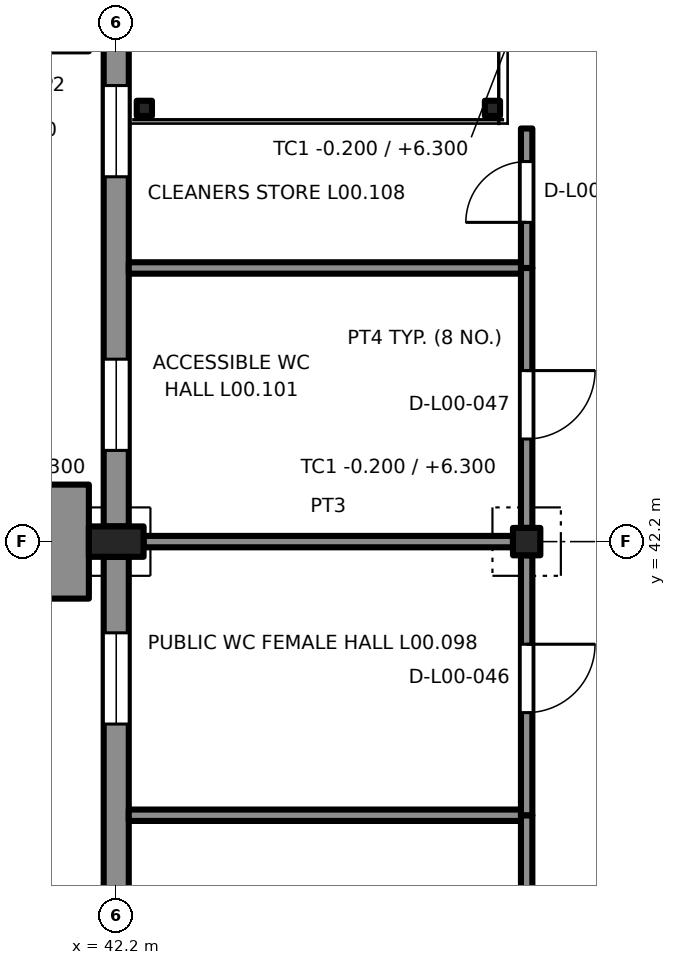
"""IFC4 building model, lengths in metres.
Left out: names, types, materials, properties, quantities, classifications, styles, units other than length and angle.
Written with IfcOpenShell. Run it as: python <this file> out.ifc"""

import sys

from ifc_helpers import new_model, si_unit, direction, frame, frame_2d, origin, origin_2d, place, context, subcontext, project, spatial, rectangle, extrude, element, fill, save


model = new_model("IFC4")
c1 = context("Model", 3, precision=1e-05, world=origin(), true_north=direction((0.0, 1.0)))
c2 = subcontext(c1, "Body", "Model", "MODEL_VIEW")
j1 = project(units=[si_unit("LENGTHUNIT", "METRE"), si_unit("PLANEANGLEUNIT", "RADIAN")], contexts=[c1])
p1 = place(None, origin())
s1 = spatial("IfcSite", under=j1, at=p1, CompositionType="ELEMENT")
p2 = place(p1, origin())
s2 = spatial("IfcBuilding", under=s1, at=p2, CompositionType="ELEMENT")
p3 = place(p2, origin())
s3 = spatial("IfcBuildingStorey", under=s2, at=p3, CompositionType="ELEMENT", Elevation=0.0)
p4 = place(p3, frame((42.2, 42.2, -0.2), z_axis=(0.0, 0.0, 1.0), x_axis=(0.0, 1.0, 0.0)))
e1 = element("IfcColumn", 1, at=p4, inside=s3, PredefinedType="COLUMN", context=c2, shape_type="SweptSolid", body=[
    extrude(rectangle(XDim=0.4, YDim=0.72, at=origin_2d()), origin(), (0.0, 0.0, 1.0), 6.5),
])
p5 = place(p3, frame((47.6, 42.2, -0.2), z_axis=(0.0, 0.0, 1.0), x_axis=(1.0, 0.0, 0.0)))
e2 = element("IfcColumn", 2, at=p5, inside=s3, PredefinedType="COLUMN", context=c2, shape_type="SweptSolid", body=[
    extrude(rectangle(XDim=0.36, YDim=0.36, at=origin_2d()), origin(), (0.0, 0.0, 1.0), 6.5),
])
for number, where, z_axis, x_axis in (
    (3, (42.57, 47.9, 0.0), (0.0, 0.0, 1.0), (1.0, 0.0, 0.0)),
    (4, (47.15, 47.9, 0.0), (0.0, 0.0, 1.0), (1.0, 0.0, 0.0)),
):
    element("IfcColumn", number, at=place(p3, frame(where, z_axis=z_axis, x_axis=x_axis)), inside=s3, PredefinedType="COLUMN", context=c2, shape_type="SweptSolid", body=[
        extrude(rectangle(XDim=0.2, YDim=0.2, at=origin_2d()), origin(), (0.0, 0.0, 1.0), 2.95),
    ])
p6 = place(p3, frame((42.2, 35.2, 0.0), z_axis=(0.0, 0.0, 1.0), x_axis=(0.0, 1.0, 0.0)))
e5 = element("IfcWall", 5, at=p6, inside=s3, PredefinedType="SOLIDWALL", context=c2, shape_type="SweptSolid", body=[
    extrude(rectangle(XDim=6.8, YDim=0.33, at=frame_2d((3.4, 0.0))), origin(), (0.0, 0.0, 1.0), 5.62),
])
p7 = place(p6, frame((1.0, 0.0, 0.9)))
e6 = element("IfcOpeningElement", 6, at=p7, cuts=e5, PredefinedType="OPENING", context=c2, shape_type="SweptSolid", body=[
    extrude(rectangle(XDim=1.2, YDim=4.2, at=frame_2d((0.6, 2.1))), frame((0.0, 0.175, 0.0), z_axis=(0.0, -1.0, 0.0), x_axis=(1.0, 0.0, 0.0)), (0.0, 0.0, 1.0), 0.35),
])
p8 = place(p6, frame((4.6, 0.0, 0.9)))
e7 = element("IfcOpeningElement", 7, at=p8, cuts=e5, PredefinedType="OPENING", context=c2, shape_type="SweptSolid", body=[
    extrude(rectangle(XDim=1.2, YDim=4.2, at=frame_2d((0.6, 2.1))), frame((0.0, 0.175, 0.0), z_axis=(0.0, -1.0, 0.0), x_axis=(1.0, 0.0, 0.0)), (0.0, 0.0, 1.0), 0.35),
])
p9 = place(p3, frame((42.2, 42.4, 0.0), z_axis=(0.0, 0.0, 1.0), x_axis=(0.0, 1.0, 0.0)))
e8 = element("IfcWall", 8, at=p9, inside=s3, PredefinedType="SOLIDWALL", context=c2, shape_type="SweptSolid", body=[
    extrude(rectangle(XDim=6.8, YDim=0.33, at=frame_2d((3.4, 0.0))), origin(), (0.0, 0.0, 1.0), 5.62),
])
p10 = place(p9, frame((1.0, 0.0, 0.9)))
e9 = element("IfcOpeningElement", 9, at=p10, cuts=e8, PredefinedType="OPENING", context=c2, shape_type="SweptSolid", body=[
    extrude(rectangle(XDim=1.2, YDim=4.2, at=frame_2d((0.6, 2.1))), frame((0.0, 0.175, 0.0), z_axis=(0.0, -1.0, 0.0), x_axis=(1.0, 0.0, 0.0)), (0.0, 0.0, 1.0), 0.35),
])
p11 = place(p9, frame((4.6, 0.0, 0.9)))
e10 = element("IfcOpeningElement", 10, at=p11, cuts=e8, PredefinedType="OPENING", context=c2, shape_type="SweptSolid", body=[
    extrude(rectangle(XDim=1.2, YDim=4.2, at=frame_2d((0.6, 2.1))), frame((0.0, 0.175, 0.0), z_axis=(0.0, -1.0, 0.0), x_axis=(1.0, 0.0, 0.0)), (0.0, 0.0, 1.0), 0.35),
])
p12 = place(p3, frame((41.29, 41.45, 0.0), z_axis=(0.0, 0.0, 1.0), x_axis=(0.0, 1.0, 0.0)))
e11 = element("IfcWall", 11, at=p12, inside=s3, PredefinedType="SOLIDWALL", context=c2, shape_type="SweptSolid", body=[
    extrude(rectangle(XDim=1.5, YDim=1.1, at=frame_2d((0.75, 0.0))), origin(), (0.0, 0.0, 1.0), 6.3),
])
p13 = place(p3, frame((47.6, 38.6, 0.0), z_axis=(0.0, 0.0, 1.0), x_axis=(0.0, -1.0, 0.0)))
e12 = element("IfcWall", 12, at=p13, inside=s3, PredefinedType="PARTITIONING", context=c2, shape_type="SweptSolid", body=[
    extrude(rectangle(XDim=3.42, YDim=0.15, at=frame_2d((1.71, 0.0))), origin(), (0.0, 0.0, 1.0), 5.62),
])
p14 = place(p13, frame((1.35, 0.0, 0.0)))
e13 = element("IfcOpeningElement", 13, at=p14, cuts=e12, PredefinedType="OPENING", context=c2, shape_type="SweptSolid", body=[
    extrude(rectangle(XDim=0.9, YDim=2.1, at=frame_2d((0.45, 1.05))), frame((0.0, 0.085, 0.0), z_axis=(0.0, -1.0, 0.0), x_axis=(1.0, 0.0, 0.0)), (0.0, 0.0, 1.0), 0.17),
])
p15 = place(p3, frame((47.6, 42.02, 0.0), z_axis=(0.0, 0.0, 1.0), x_axis=(0.0, -1.0, 0.0)))
e14 = element("IfcWall", 14, at=p15, inside=s3, PredefinedType="PARTITIONING", context=c2, shape_type="SweptSolid", body=[
    extrude(rectangle(XDim=3.42, YDim=0.15, at=frame_2d((1.71, 0.0))), origin(), (0.0, 0.0, 1.0), 5.62),
])
p16 = place(p15, frame((1.17, 0.0, 0.0)))
e15 = element("IfcOpeningElement", 15, at=p16, cuts=e14, PredefinedType="OPENING", context=c2, shape_type="SweptSolid", body=[
    extrude(rectangle(XDim=0.9, YDim=2.1, at=frame_2d((0.45, 1.05))), frame((0.0, 0.085, 0.0), z_axis=(0.0, -1.0, 0.0), x_axis=(1.0, 0.0, 0.0)), (0.0, 0.0, 1.0), 0.17),
])
p17 = place(p3, frame((42.365, 38.6, 0.0), z_axis=(0.0, 0.0, 1.0), x_axis=(1.0, 0.0, 0.0)))
e16 = element("IfcWall", 16, at=p17, inside=s3, PredefinedType="PARTITIONING", context=c2, shape_type="SweptSolid", body=[
    extrude(rectangle(XDim=5.16, YDim=0.15, at=frame_2d((2.58, 0.0))), origin(), (0.0, 0.0, 1.0), 6.26),
])
p18 = place(p3, frame((47.6, 45.8, 0.0), z_axis=(0.0, 0.0, 1.0), x_axis=(0.0, -1.0, 0.0)))
e17 = element("IfcWall", 17, at=p18, inside=s3, PredefinedType="PARTITIONING", context=c2, shape_type="SweptSolid", body=[
    extrude(rectangle(XDim=3.42, YDim=0.15, at=frame_2d((1.71, 0.0))), origin(), (0.0, 0.0, 1.0), 5.62),
])
p19 = place(p18, frame((1.35, 0.0, 0.0)))
e18 = element("IfcOpeningElement", 18, at=p19, cuts=e17, PredefinedType="OPENING", context=c2, shape_type="SweptSolid", body=[
    extrude(rectangle(XDim=0.9, YDim=2.1, at=frame_2d((0.45, 1.05))), frame((0.0, 0.085, 0.0), z_axis=(0.0, -1.0, 0.0), x_axis=(1.0, 0.0, 0.0)), (0.0, 0.0, 1.0), 0.17),
])
p20 = place(p3, frame((42.56, 42.2, 0.0), z_axis=(0.0, 0.0, 1.0), x_axis=(1.0, 0.0, 0.0)))
e19 = element("IfcWall", 19, at=p20, inside=s3, PredefinedType="PARTITIONING", context=c2, shape_type="SweptSolid", body=[
    extrude(rectangle(XDim=4.86, YDim=0.15, at=frame_2d((2.43, 0.0))), origin(), (0.0, 0.0, 1.0), 6.26),
])
p21 = place(p3, frame((47.6, 45.8, 0.0), z_axis=(0.0, 0.0, 1.0), x_axis=(0.0, 1.0, 0.0)))
e20 = element("IfcWall", 20, at=p21, inside=s3, PredefinedType="PARTITIONING", context=c2, shape_type="SweptSolid", body=[
    extrude(rectangle(XDim=1.835, YDim=0.15, at=frame_2d((0.917, 0.0))), origin(), (0.0, 0.0, 1.0), 5.62),
])
p22 = place(p21, frame((0.6, 0.0, 0.0)))
e21 = element("IfcOpeningElement", 21, at=p22, cuts=e20, PredefinedType="OPENING", context=c2, shape_type="SweptSolid", body=[
    extrude(rectangle(XDim=0.8, YDim=2.1, at=frame_2d((0.4, 1.05))), frame((0.0, 0.085, 0.0), z_axis=(0.0, -1.0, 0.0), x_axis=(1.0, 0.0, 0.0)), (0.0, 0.0, 1.0), 0.17),
])
p23 = place(p3, frame((42.365, 45.8, 0.0), z_axis=(0.0, 0.0, 1.0), x_axis=(1.0, 0.0, 0.0)))
e22 = element("IfcWall", 22, at=p23, inside=s3, PredefinedType="PARTITIONING", context=c2, shape_type="SweptSolid", body=[
    extrude(rectangle(XDim=5.16, YDim=0.15, at=frame_2d((2.58, 0.0))), origin(), (0.0, 0.0, 1.0), 6.26),
])
p24 = place(p8, origin())
e23 = element("IfcWindow", 23, at=p24, inside=s3, PartitioningType="SINGLE_PANEL", PredefinedType="WINDOW", context=c2, shape_type="SweptSolid", body=[
    extrude(rectangle(XDim=1.2, YDim=4.2, at=frame_2d((0.6, 2.1))), frame((0.0, -0.03, 0.0), z_axis=(0.0, -1.0, 0.0), x_axis=(1.0, 0.0, 0.0)), (0.0, 0.0, 1.0), 0.06),
])
fill(e7, e23)
p25 = place(p10, origin())
e24 = element("IfcWindow", 24, at=p25, inside=s3, PartitioningType="SINGLE_PANEL", PredefinedType="WINDOW", context=c2, shape_type="SweptSolid", body=[
    extrude(rectangle(XDim=1.2, YDim=4.2, at=frame_2d((0.6, 2.1))), frame((0.0, -0.03, 0.0), z_axis=(0.0, -1.0, 0.0), x_axis=(1.0, 0.0, 0.0)), (0.0, 0.0, 1.0), 0.06),
])
fill(e9, e24)
p26 = place(p11, origin())
e25 = element("IfcWindow", 25, at=p26, inside=s3, PartitioningType="SINGLE_PANEL", PredefinedType="WINDOW", context=c2, shape_type="SweptSolid", body=[
    extrude(rectangle(XDim=1.2, YDim=4.2, at=frame_2d((0.6, 2.1))), frame((0.0, -0.03, 0.0), z_axis=(0.0, -1.0, 0.0), x_axis=(1.0, 0.0, 0.0)), (0.0, 0.0, 1.0), 0.06),
])
fill(e10, e25)
p27 = place(p16, origin())
e26 = element("IfcDoor", 26, at=p27, inside=s3, OperationType="SINGLE_SWING_LEFT", PredefinedType="DOOR", context=c2, shape_type="SweptSolid", body=[
    extrude(rectangle(XDim=0.9, YDim=2.1, at=frame_2d((0.45, 1.05))), frame((0.0, 0.025, 0.0), z_axis=(0.0, -1.0, 0.0), x_axis=(1.0, 0.0, 0.0)), (0.0, 0.0, 1.0), 0.05),
])
fill(e15, e26)
p28 = place(p19, origin())
e27 = element("IfcDoor", 27, at=p28, inside=s3, OperationType="SINGLE_SWING_RIGHT", PredefinedType="DOOR", context=c2, shape_type="SweptSolid", body=[
    extrude(rectangle(XDim=0.9, YDim=2.1, at=frame_2d((0.45, 1.05))), frame((0.0, 0.025, 0.0), z_axis=(0.0, -1.0, 0.0), x_axis=(1.0, 0.0, 0.0)), (0.0, 0.0, 1.0), 0.05),
])
fill(e18, e27)
p29 = place(p22, origin())
e28 = element("IfcDoor", 28, at=p29, inside=s3, OperationType="SINGLE_SWING_RIGHT", PredefinedType="DOOR", context=c2, shape_type="SweptSolid", body=[
    extrude(rectangle(XDim=0.8, YDim=2.1, at=frame_2d((0.4, 1.05))), frame((0.0, 0.025, 0.0), z_axis=(0.0, -1.0, 0.0), x_axis=(1.0, 0.0, 0.0)), (0.0, 0.0, 1.0), 0.05),
])
fill(e21, e28)
save(model, sys.argv[1])
